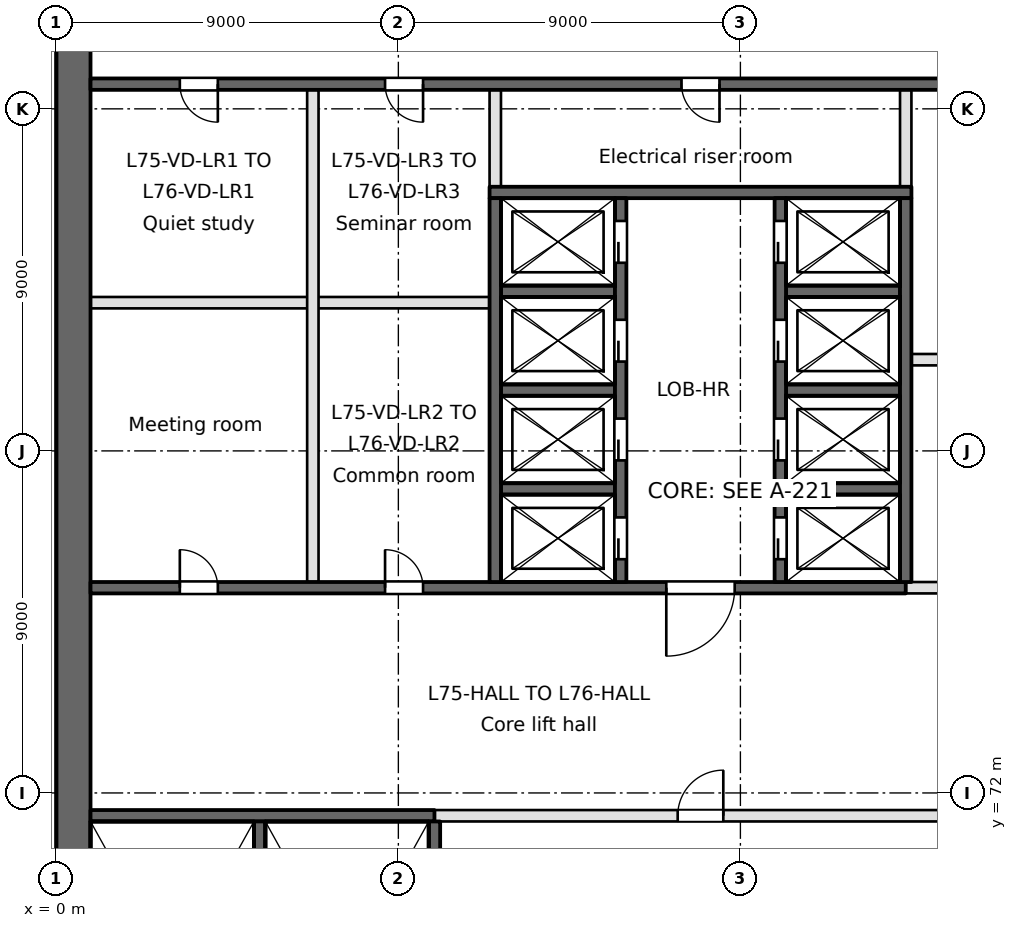
"""IFC4 building model, lengths in metres.
Left out: names, types, materials, properties, quantities, classifications, styles, units other than length and angle.
Written with IfcOpenShell. Run it as: python <this file> out.ifc"""

import sys

from ifc_helpers import new_model, si_unit, direction, frame, frame_2d, origin, place, context, subcontext, project, spatial, rectangle, extrude, element, fill, save


model = new_model("IFC4")
c1 = context("Model", 3, precision=1e-05, world=origin(), true_north=direction((0.0, 1.0)))
c2 = subcontext(c1, "Body", "Model", "MODEL_VIEW")
j1 = project(units=[si_unit("LENGTHUNIT", "METRE"), si_unit("PLANEANGLEUNIT", "RADIAN")], contexts=[c1])
p1 = place(None, origin())
s1 = spatial("IfcSite", under=j1, at=p1, CompositionType="ELEMENT")
p2 = place(p1, origin())
s2 = spatial("IfcBuilding", under=s1, at=p2, CompositionType="ELEMENT")
p3 = place(p2, frame((0.0, 0.0, 291.9)))
s3 = spatial("IfcBuildingStorey", under=s2, at=p3, CompositionType="ELEMENT", Elevation=291.9)
p4 = place(p3, frame((0.45, 94.5, 0.0), z_axis=(0.0, 0.0, 1.0), x_axis=(0.0, -1.0, 0.0)))
e1 = element("IfcWall", 1, at=p4, inside=s3, PredefinedType="SHEAR", context=c2, shape_type="SweptSolid", body=[
    extrude(rectangle(XDim=40.456, YDim=0.9, at=frame_2d((20.228, 0.0))), origin(), (0.0, 0.0, 1.0), 3.7),
])
p5 = place(p3, frame((0.9, 71.4, -0.4), z_axis=(0.0, 0.0, 1.0), x_axis=(1.0, 0.0, 0.0)))
e2 = element("IfcWall", 2, at=p5, inside=s3, PredefinedType="SOLIDWALL", context=c2, shape_type="SweptSolid", body=[
    extrude(rectangle(XDim=9.05, YDim=0.3, at=frame_2d((4.525, 0.0))), origin(), (0.0, 0.0, 1.0), 3.7),
])
p6 = place(p3, frame((9.95, 71.4, 0.0), z_axis=(0.0, 0.0, 1.0), x_axis=(1.0, 0.0, 0.0)))
e3 = element("IfcWall", 3, at=p6, inside=s3, PredefinedType="PARTITIONING", context=c2, shape_type="SweptSolid", body=[
    extrude(rectangle(XDim=17.65, YDim=0.3, at=frame_2d((8.825, 0.0))), origin(), (0.0, 0.0, 1.0), 3.3),
])
p7 = place(p6, frame((14.85, 0.0, 0.0)))
e4 = element("IfcOpeningElement", 4, at=p7, cuts=e3, PredefinedType="OPENING", context=c2, shape_type="SweptSolid", body=[
    extrude(rectangle(XDim=1.8, YDim=2.1, at=frame_2d((0.9, 1.05))), frame((0.0, 0.15, 0.0), z_axis=(0.0, -1.0, 0.0), x_axis=(1.0, 0.0, 0.0)), (0.0, 0.0, 1.0), 0.3),
])
p8 = place(p6, frame((6.4, 0.0, 0.0)))
e5 = element("IfcOpeningElement", 5, at=p8, cuts=e3, PredefinedType="OPENING", context=c2, shape_type="SweptSolid", body=[
    extrude(rectangle(XDim=1.2, YDim=2.1, at=frame_2d((0.6, 1.05))), frame((0.0, 0.15, 0.0), z_axis=(0.0, -1.0, 0.0), x_axis=(1.0, 0.0, 0.0)), (0.0, 0.0, 1.0), 0.3),
])
p9 = place(p3, frame((0.9, 77.4, -0.4), z_axis=(0.0, 0.0, 1.0), x_axis=(1.0, 0.0, 0.0)))
e6 = element("IfcWall", 6, at=p9, inside=s3, PredefinedType="SOLIDWALL", context=c2, shape_type="SweptSolid", body=[
    extrude(rectangle(XDim=21.45, YDim=0.3, at=frame_2d((10.725, 0.0))), origin(), (0.0, 0.0, 1.0), 3.7),
])
p10 = place(p9, frame((15.15, 0.0, 0.4)))
e7 = element("IfcOpeningElement", 7, at=p10, cuts=e6, PredefinedType="OPENING", context=c2, shape_type="SweptSolid", body=[
    extrude(rectangle(XDim=1.8, YDim=2.1, at=frame_2d((0.9, 1.05))), frame((0.0, 0.15, 0.0), z_axis=(0.0, -1.0, 0.0), x_axis=(1.0, 0.0, 0.0)), (0.0, 0.0, 1.0), 0.3),
])
p11 = place(p9, frame((2.35, 0.0, 0.4)))
e8 = element("IfcOpeningElement", 8, at=p11, cuts=e6, PredefinedType="OPENING", context=c2, shape_type="SweptSolid", body=[
    extrude(rectangle(XDim=1.0, YDim=2.1, at=frame_2d((0.5, 1.05))), frame((0.0, 0.15, 0.0), z_axis=(0.0, -1.0, 0.0), x_axis=(1.0, 0.0, 0.0)), (0.0, 0.0, 1.0), 0.3),
])
p12 = place(p9, frame((7.75, 0.0, 0.4)))
e9 = element("IfcOpeningElement", 9, at=p12, cuts=e6, PredefinedType="OPENING", context=c2, shape_type="SweptSolid", body=[
    extrude(rectangle(XDim=1.0, YDim=2.1, at=frame_2d((0.5, 1.05))), frame((0.0, 0.15, 0.0), z_axis=(0.0, -1.0, 0.0), x_axis=(1.0, 0.0, 0.0)), (0.0, 0.0, 1.0), 0.3),
])
p13 = place(p3, frame((22.35, 77.4, 0.0), z_axis=(0.0, 0.0, 1.0), x_axis=(1.0, 0.0, 0.0)))
e10 = element("IfcWall", 10, at=p13, inside=s3, PredefinedType="PARTITIONING", context=c2, shape_type="SweptSolid", body=[
    extrude(rectangle(XDim=13.15, YDim=0.3, at=frame_2d((6.575, 0.0))), origin(), (0.0, 0.0, 1.0), 3.3),
])
p14 = place(p13, frame((3.0, 0.0, 0.0)))
e11 = element("IfcOpeningElement", 11, at=p14, cuts=e10, PredefinedType="OPENING", context=c2, shape_type="SweptSolid", body=[
    extrude(rectangle(XDim=1.0, YDim=2.1, at=frame_2d((0.5, 1.05))), frame((0.0, 0.15, 0.0), z_axis=(0.0, -1.0, 0.0), x_axis=(1.0, 0.0, 0.0)), (0.0, 0.0, 1.0), 0.3),
])
p15 = place(p13, frame((9.7, 0.0, 0.0)))
e12 = element("IfcOpeningElement", 12, at=p15, cuts=e10, PredefinedType="OPENING", context=c2, shape_type="SweptSolid", body=[
    extrude(rectangle(XDim=1.0, YDim=2.1, at=frame_2d((0.5, 1.05))), frame((0.0, 0.15, 0.0), z_axis=(0.0, -1.0, 0.0), x_axis=(1.0, 0.0, 0.0)), (0.0, 0.0, 1.0), 0.3),
])
for number, where, z_axis, x_axis in (
    (13, (11.7, 80.0, -0.4), (0.0, 0.0, 1.0), (1.0, 0.0, 0.0)),
    (14, (19.2, 80.0, -0.4), (0.0, 0.0, 1.0), (1.0, 0.0, 0.0)),
    (15, (11.7, 82.6, -0.4), (0.0, 0.0, 1.0), (1.0, 0.0, 0.0)),
    (16, (19.2, 82.6, -0.4), (0.0, 0.0, 1.0), (1.0, 0.0, 0.0)),
):
    element("IfcWall", number, at=place(p3, frame(where, z_axis=z_axis, x_axis=x_axis)), inside=s3, PredefinedType="SOLIDWALL", context=c2, shape_type="SweptSolid", body=[
        extrude(rectangle(XDim=3.0, YDim=0.3, at=frame_2d((1.5, 0.0))), origin(), (0.0, 0.0, 1.0), 3.7),
    ])
p16 = place(p3, frame((22.5, 83.4, 0.0), z_axis=(0.0, 0.0, 1.0), x_axis=(1.0, 0.0, 0.0)))
e17 = element("IfcWall", 17, at=p16, inside=s3, PredefinedType="PARTITIONING", context=c2, shape_type="SweptSolid", body=[
    extrude(rectangle(XDim=6.7, YDim=0.3, at=frame_2d((3.35, 0.0))), origin(), (0.0, 0.0, 1.0), 3.3),
])
p17 = place(p3, frame((0.9, 84.9, 0.0), z_axis=(0.0, 0.0, 1.0), x_axis=(1.0, 0.0, 0.0)))
e18 = element("IfcWall", 18, at=p17, inside=s3, PredefinedType="PARTITIONING", context=c2, shape_type="SweptSolid", body=[
    extrude(rectangle(XDim=10.5, YDim=0.3, at=frame_2d((5.25, 0.0))), origin(), (0.0, 0.0, 1.0), 3.3),
])
for number, where, z_axis, x_axis in (
    (19, (11.7, 85.2, -0.4), (0.0, 0.0, 1.0), (1.0, 0.0, 0.0)),
    (20, (19.2, 85.2, -0.4), (0.0, 0.0, 1.0), (1.0, 0.0, 0.0)),
):
    element("IfcWall", number, at=place(p3, frame(where, z_axis=z_axis, x_axis=x_axis)), inside=s3, PredefinedType="SOLIDWALL", context=c2, shape_type="SweptSolid", body=[
        extrude(rectangle(XDim=3.0, YDim=0.3, at=frame_2d((1.5, 0.0))), origin(), (0.0, 0.0, 1.0), 3.7),
    ])
p18 = place(p3, frame((11.4, 87.8, -0.4), z_axis=(0.0, 0.0, 1.0), x_axis=(1.0, 0.0, 0.0)))
e21 = element("IfcWall", 21, at=p18, inside=s3, PredefinedType="SOLIDWALL", context=c2, shape_type="SweptSolid", body=[
    extrude(rectangle(XDim=11.1, YDim=0.3, at=frame_2d((5.55, 0.0))), origin(), (0.0, 0.0, 1.0), 3.7),
])
p19 = place(p3, frame((0.9, 90.65, -0.4), z_axis=(0.0, 0.0, 1.0), x_axis=(1.0, 0.0, 0.0)))
e22 = element("IfcWall", 22, at=p19, inside=s3, PredefinedType="SOLIDWALL", context=c2, shape_type="SweptSolid", body=[
    extrude(rectangle(XDim=34.6, YDim=0.3, at=frame_2d((17.3, 0.0))), origin(), (0.0, 0.0, 1.0), 3.7),
])
p20 = place(p19, frame((15.55, 0.0, 0.4)))
e23 = element("IfcOpeningElement", 23, at=p20, cuts=e22, PredefinedType="OPENING", context=c2, shape_type="SweptSolid", body=[
    extrude(rectangle(XDim=1.0, YDim=2.1, at=frame_2d((0.5, 1.05))), frame((0.0, 0.15, 0.0), z_axis=(0.0, -1.0, 0.0), x_axis=(1.0, 0.0, 0.0)), (0.0, 0.0, 1.0), 0.3),
])
p21 = place(p19, frame((2.35, 0.0, 0.4)))
e24 = element("IfcOpeningElement", 24, at=p21, cuts=e22, PredefinedType="OPENING", context=c2, shape_type="SweptSolid", body=[
    extrude(rectangle(XDim=1.0, YDim=2.1, at=frame_2d((0.5, 1.05))), frame((0.0, 0.15, 0.0), z_axis=(0.0, -1.0, 0.0), x_axis=(1.0, 0.0, 0.0)), (0.0, 0.0, 1.0), 0.3),
])
p22 = place(p19, frame((7.75, 0.0, 0.4)))
e25 = element("IfcOpeningElement", 25, at=p22, cuts=e22, PredefinedType="OPENING", context=c2, shape_type="SweptSolid", body=[
    extrude(rectangle(XDim=1.0, YDim=2.1, at=frame_2d((0.5, 1.05))), frame((0.0, 0.15, 0.0), z_axis=(0.0, -1.0, 0.0), x_axis=(1.0, 0.0, 0.0)), (0.0, 0.0, 1.0), 0.3),
])
p23 = place(p19, frame((24.45, 0.0, 0.4)))
e26 = element("IfcOpeningElement", 26, at=p23, cuts=e22, PredefinedType="OPENING", context=c2, shape_type="SweptSolid", body=[
    extrude(rectangle(XDim=1.0, YDim=2.1, at=frame_2d((0.5, 1.05))), frame((0.0, 0.15, 0.0), z_axis=(0.0, -1.0, 0.0), x_axis=(1.0, 0.0, 0.0)), (0.0, 0.0, 1.0), 0.3),
])
p24 = place(p19, frame((31.15, 0.0, 0.4)))
e27 = element("IfcOpeningElement", 27, at=p24, cuts=e22, PredefinedType="OPENING", context=c2, shape_type="SweptSolid", body=[
    extrude(rectangle(XDim=1.0, YDim=2.1, at=frame_2d((0.5, 1.05))), frame((0.0, 0.15, 0.0), z_axis=(0.0, -1.0, 0.0), x_axis=(1.0, 0.0, 0.0)), (0.0, 0.0, 1.0), 0.3),
])
p25 = place(p3, frame((5.35, 63.5, -0.4), z_axis=(0.0, 0.0, 1.0), x_axis=(0.0, 1.0, 0.0)))
e28 = element("IfcWall", 28, at=p25, inside=s3, PredefinedType="SOLIDWALL", context=c2, shape_type="SweptSolid", body=[
    extrude(rectangle(XDim=7.75, YDim=0.3, at=frame_2d((3.875, 0.0))), origin(), (0.0, 0.0, 1.0), 3.7),
])
p26 = place(p3, frame((6.75, 77.55, 0.0), z_axis=(0.0, 0.0, 1.0), x_axis=(0.0, 1.0, 0.0)))
e29 = element("IfcWall", 29, at=p26, inside=s3, PredefinedType="PARTITIONING", context=c2, shape_type="SweptSolid", body=[
    extrude(rectangle(XDim=12.95, YDim=0.3, at=frame_2d((6.475, 0.0))), origin(), (0.0, 0.0, 1.0), 3.3),
])
p27 = place(p3, frame((9.95, 63.5, -0.4), z_axis=(0.0, 0.0, 1.0), x_axis=(0.0, 1.0, 0.0)))
e30 = element("IfcWall", 30, at=p27, inside=s3, PredefinedType="SOLIDWALL", context=c2, shape_type="SweptSolid", body=[
    extrude(rectangle(XDim=7.75, YDim=0.3, at=frame_2d((3.875, 0.0))), origin(), (0.0, 0.0, 1.0), 3.7),
])
p28 = place(p3, frame((11.55, 77.55, -0.4), z_axis=(0.0, 0.0, 1.0), x_axis=(0.0, 1.0, 0.0)))
e31 = element("IfcWall", 31, at=p28, inside=s3, PredefinedType="SOLIDWALL", context=c2, shape_type="SweptSolid", body=[
    extrude(rectangle(XDim=10.1, YDim=0.3, at=frame_2d((5.05, 0.0))), origin(), (0.0, 0.0, 1.0), 3.7),
])
p29 = place(p3, frame((11.55, 87.95, 0.0), z_axis=(0.0, 0.0, 1.0), x_axis=(0.0, 1.0, 0.0)))
e32 = element("IfcWall", 32, at=p29, inside=s3, PredefinedType="PARTITIONING", context=c2, shape_type="SweptSolid", body=[
    extrude(rectangle(XDim=2.55, YDim=0.3, at=frame_2d((1.275, 0.0))), origin(), (0.0, 0.0, 1.0), 3.3),
])
p30 = place(p3, frame((14.85, 77.55, -0.4), z_axis=(0.0, 0.0, 1.0), x_axis=(0.0, 1.0, 0.0)))
e33 = element("IfcWall", 33, at=p30, inside=s3, PredefinedType="SOLIDWALL", context=c2, shape_type="SweptSolid", body=[
    extrude(rectangle(XDim=10.1, YDim=0.3, at=frame_2d((5.05, 0.0))), origin(), (0.0, 0.0, 1.0), 3.7),
])
p31 = place(p30, frame((0.6, 0.0, 0.4)))
e34 = element("IfcOpeningElement", 34, at=p31, cuts=e33, PredefinedType="OPENING", context=c2, shape_type="SweptSolid", body=[
    extrude(rectangle(XDim=1.1, YDim=2.1, at=frame_2d((0.55, 1.05))), frame((0.0, 0.15, 0.0), z_axis=(0.0, -1.0, 0.0), x_axis=(1.0, 0.0, 0.0)), (0.0, 0.0, 1.0), 0.3),
])
p32 = place(p30, frame((3.2, 0.0, 0.4)))
e35 = element("IfcOpeningElement", 35, at=p32, cuts=e33, PredefinedType="OPENING", context=c2, shape_type="SweptSolid", body=[
    extrude(rectangle(XDim=1.1, YDim=2.1, at=frame_2d((0.55, 1.05))), frame((0.0, 0.15, 0.0), z_axis=(0.0, -1.0, 0.0), x_axis=(1.0, 0.0, 0.0)), (0.0, 0.0, 1.0), 0.3),
])
p33 = place(p30, frame((5.8, 0.0, 0.4)))
e36 = element("IfcOpeningElement", 36, at=p33, cuts=e33, PredefinedType="OPENING", context=c2, shape_type="SweptSolid", body=[
    extrude(rectangle(XDim=1.1, YDim=2.1, at=frame_2d((0.55, 1.05))), frame((0.0, 0.15, 0.0), z_axis=(0.0, -1.0, 0.0), x_axis=(1.0, 0.0, 0.0)), (0.0, 0.0, 1.0), 0.3),
])
p34 = place(p30, frame((8.4, 0.0, 0.4)))
e37 = element("IfcOpeningElement", 37, at=p34, cuts=e33, PredefinedType="OPENING", context=c2, shape_type="SweptSolid", body=[
    extrude(rectangle(XDim=1.1, YDim=2.1, at=frame_2d((0.55, 1.05))), frame((0.0, 0.15, 0.0), z_axis=(0.0, -1.0, 0.0), x_axis=(1.0, 0.0, 0.0)), (0.0, 0.0, 1.0), 0.3),
])
p35 = place(p3, frame((19.05, 77.55, -0.4), z_axis=(0.0, 0.0, 1.0), x_axis=(0.0, 1.0, 0.0)))
e38 = element("IfcWall", 38, at=p35, inside=s3, PredefinedType="SOLIDWALL", context=c2, shape_type="SweptSolid", body=[
    extrude(rectangle(XDim=10.1, YDim=0.3, at=frame_2d((5.05, 0.0))), origin(), (0.0, 0.0, 1.0), 3.7),
])
p36 = place(p35, frame((0.6, 0.0, 0.4)))
e39 = element("IfcOpeningElement", 39, at=p36, cuts=e38, PredefinedType="OPENING", context=c2, shape_type="SweptSolid", body=[
    extrude(rectangle(XDim=1.1, YDim=2.1, at=frame_2d((0.55, 1.05))), frame((0.0, 0.15, 0.0), z_axis=(0.0, -1.0, 0.0), x_axis=(1.0, 0.0, 0.0)), (0.0, 0.0, 1.0), 0.3),
])
p37 = place(p35, frame((3.2, 0.0, 0.4)))
e40 = element("IfcOpeningElement", 40, at=p37, cuts=e38, PredefinedType="OPENING", context=c2, shape_type="SweptSolid", body=[
    extrude(rectangle(XDim=1.1, YDim=2.1, at=frame_2d((0.55, 1.05))), frame((0.0, 0.15, 0.0), z_axis=(0.0, -1.0, 0.0), x_axis=(1.0, 0.0, 0.0)), (0.0, 0.0, 1.0), 0.3),
])
p38 = place(p35, frame((5.8, 0.0, 0.4)))
e41 = element("IfcOpeningElement", 41, at=p38, cuts=e38, PredefinedType="OPENING", context=c2, shape_type="SweptSolid", body=[
    extrude(rectangle(XDim=1.1, YDim=2.1, at=frame_2d((0.55, 1.05))), frame((0.0, 0.15, 0.0), z_axis=(0.0, -1.0, 0.0), x_axis=(1.0, 0.0, 0.0)), (0.0, 0.0, 1.0), 0.3),
])
p39 = place(p35, frame((8.4, 0.0, 0.4)))
e42 = element("IfcOpeningElement", 42, at=p39, cuts=e38, PredefinedType="OPENING", context=c2, shape_type="SweptSolid", body=[
    extrude(rectangle(XDim=1.1, YDim=2.1, at=frame_2d((0.55, 1.05))), frame((0.0, 0.15, 0.0), z_axis=(0.0, -1.0, 0.0), x_axis=(1.0, 0.0, 0.0)), (0.0, 0.0, 1.0), 0.3),
])
p40 = place(p3, frame((22.35, 77.55, -0.4), z_axis=(0.0, 0.0, 1.0), x_axis=(0.0, 1.0, 0.0)))
e43 = element("IfcWall", 43, at=p40, inside=s3, PredefinedType="SOLIDWALL", context=c2, shape_type="SweptSolid", body=[
    extrude(rectangle(XDim=10.1, YDim=0.3, at=frame_2d((5.05, 0.0))), origin(), (0.0, 0.0, 1.0), 3.7),
])
p41 = place(p3, frame((22.35, 87.95, 0.0), z_axis=(0.0, 0.0, 1.0), x_axis=(0.0, 1.0, 0.0)))
e44 = element("IfcWall", 44, at=p41, inside=s3, PredefinedType="PARTITIONING", context=c2, shape_type="SweptSolid", body=[
    extrude(rectangle(XDim=2.55, YDim=0.3, at=frame_2d((1.275, 0.0))), origin(), (0.0, 0.0, 1.0), 3.3),
])
p42 = place(p31, origin())
e45 = element("IfcDoor", 45, at=p42, inside=s3, OperationType="SLIDING_TO_RIGHT", PredefinedType="DOOR", context=c2, shape_type="SweptSolid", body=[
    extrude(rectangle(XDim=1.1, YDim=2.1, at=frame_2d((0.55, 1.05))), frame((0.0, 0.025, 0.0), z_axis=(0.0, -1.0, 0.0), x_axis=(1.0, 0.0, 0.0)), (0.0, 0.0, 1.0), 0.05),
])
fill(e34, e45)
p43 = place(p32, origin())
e46 = element("IfcDoor", 46, at=p43, inside=s3, OperationType="SLIDING_TO_LEFT", PredefinedType="DOOR", context=c2, shape_type="SweptSolid", body=[
    extrude(rectangle(XDim=1.1, YDim=2.1, at=frame_2d((0.55, 1.05))), frame((0.0, 0.025, 0.0), z_axis=(0.0, -1.0, 0.0), x_axis=(1.0, 0.0, 0.0)), (0.0, 0.0, 1.0), 0.05),
])
fill(e35, e46)
p44 = place(p33, origin())
e47 = element("IfcDoor", 47, at=p44, inside=s3, OperationType="SLIDING_TO_RIGHT", PredefinedType="DOOR", context=c2, shape_type="SweptSolid", body=[
    extrude(rectangle(XDim=1.1, YDim=2.1, at=frame_2d((0.55, 1.05))), frame((0.0, 0.025, 0.0), z_axis=(0.0, -1.0, 0.0), x_axis=(1.0, 0.0, 0.0)), (0.0, 0.0, 1.0), 0.05),
])
fill(e36, e47)
p45 = place(p34, origin())
e48 = element("IfcDoor", 48, at=p45, inside=s3, OperationType="SLIDING_TO_LEFT", PredefinedType="DOOR", context=c2, shape_type="SweptSolid", body=[
    extrude(rectangle(XDim=1.1, YDim=2.1, at=frame_2d((0.55, 1.05))), frame((0.0, 0.025, 0.0), z_axis=(0.0, -1.0, 0.0), x_axis=(1.0, 0.0, 0.0)), (0.0, 0.0, 1.0), 0.05),
])
fill(e37, e48)
p46 = place(p36, origin())
e49 = element("IfcDoor", 49, at=p46, inside=s3, OperationType="SLIDING_TO_RIGHT", PredefinedType="DOOR", context=c2, shape_type="SweptSolid", body=[
    extrude(rectangle(XDim=1.1, YDim=2.1, at=frame_2d((0.55, 1.05))), frame((0.0, 0.025, 0.0), z_axis=(0.0, -1.0, 0.0), x_axis=(1.0, 0.0, 0.0)), (0.0, 0.0, 1.0), 0.05),
])
fill(e39, e49)
p47 = place(p37, origin())
e50 = element("IfcDoor", 50, at=p47, inside=s3, OperationType="SLIDING_TO_LEFT", PredefinedType="DOOR", context=c2, shape_type="SweptSolid", body=[
    extrude(rectangle(XDim=1.1, YDim=2.1, at=frame_2d((0.55, 1.05))), frame((0.0, 0.025, 0.0), z_axis=(0.0, -1.0, 0.0), x_axis=(1.0, 0.0, 0.0)), (0.0, 0.0, 1.0), 0.05),
])
fill(e40, e50)
p48 = place(p38, origin())
e51 = element("IfcDoor", 51, at=p48, inside=s3, OperationType="SLIDING_TO_RIGHT", PredefinedType="DOOR", context=c2, shape_type="SweptSolid", body=[
    extrude(rectangle(XDim=1.1, YDim=2.1, at=frame_2d((0.55, 1.05))), frame((0.0, 0.025, 0.0), z_axis=(0.0, -1.0, 0.0), x_axis=(1.0, 0.0, 0.0)), (0.0, 0.0, 1.0), 0.05),
])
fill(e41, e51)
p49 = place(p39, origin())
e52 = element("IfcDoor", 52, at=p49, inside=s3, OperationType="SLIDING_TO_LEFT", PredefinedType="DOOR", context=c2, shape_type="SweptSolid", body=[
    extrude(rectangle(XDim=1.1, YDim=2.1, at=frame_2d((0.55, 1.05))), frame((0.0, 0.025, 0.0), z_axis=(0.0, -1.0, 0.0), x_axis=(1.0, 0.0, 0.0)), (0.0, 0.0, 1.0), 0.05),
])
fill(e42, e52)
p50 = place(p10, frame((1.8, 0.0, 0.0), z_axis=(0.0, 0.0, 1.0), x_axis=(-1.0, 0.0, 0.0)))
e53 = element("IfcDoor", 53, at=p50, inside=s3, OperationType="SINGLE_SWING_RIGHT", PredefinedType="DOOR", context=c2, shape_type="SweptSolid", body=[
    extrude(rectangle(XDim=1.8, YDim=2.1, at=frame_2d((0.9, 1.05))), frame((0.0, 0.025, 0.0), z_axis=(0.0, -1.0, 0.0), x_axis=(1.0, 0.0, 0.0)), (0.0, 0.0, 1.0), 0.05),
])
fill(e7, e53)
p51 = place(p8, origin())
e54 = element("IfcDoor", 54, at=p51, inside=s3, OperationType="SINGLE_SWING_RIGHT", PredefinedType="DOOR", context=c2, shape_type="SweptSolid", body=[
    extrude(rectangle(XDim=1.2, YDim=2.1, at=frame_2d((0.6, 1.05))), frame((0.0, 0.025, 0.0), z_axis=(0.0, -1.0, 0.0), x_axis=(1.0, 0.0, 0.0)), (0.0, 0.0, 1.0), 0.05),
])
fill(e5, e54)
p52 = place(p20, frame((1.0, 0.0, 0.0), z_axis=(0.0, 0.0, 1.0), x_axis=(-1.0, 0.0, 0.0)))
e55 = element("IfcDoor", 55, at=p52, inside=s3, OperationType="SINGLE_SWING_LEFT", PredefinedType="DOOR", context=c2, shape_type="SweptSolid", body=[
    extrude(rectangle(XDim=1.0, YDim=2.1, at=frame_2d((0.5, 1.05))), frame((0.0, 0.025, 0.0), z_axis=(0.0, -1.0, 0.0), x_axis=(1.0, 0.0, 0.0)), (0.0, 0.0, 1.0), 0.05),
])
fill(e23, e55)
p53 = place(p11, origin())
e56 = element("IfcDoor", 56, at=p53, inside=s3, OperationType="SINGLE_SWING_LEFT", PredefinedType="DOOR", context=c2, shape_type="SweptSolid", body=[
    extrude(rectangle(XDim=1.0, YDim=2.1, at=frame_2d((0.5, 1.05))), frame((0.0, 0.025, 0.0), z_axis=(0.0, -1.0, 0.0), x_axis=(1.0, 0.0, 0.0)), (0.0, 0.0, 1.0), 0.05),
])
fill(e8, e56)
p54 = place(p21, frame((1.0, 0.0, 0.0), z_axis=(0.0, 0.0, 1.0), x_axis=(-1.0, 0.0, 0.0)))
e57 = element("IfcDoor", 57, at=p54, inside=s3, OperationType="SINGLE_SWING_LEFT", PredefinedType="DOOR", context=c2, shape_type="SweptSolid", body=[
    extrude(rectangle(XDim=1.0, YDim=2.1, at=frame_2d((0.5, 1.05))), frame((0.0, 0.025, 0.0), z_axis=(0.0, -1.0, 0.0), x_axis=(1.0, 0.0, 0.0)), (0.0, 0.0, 1.0), 0.05),
])
fill(e24, e57)
p55 = place(p12, origin())
e58 = element("IfcDoor", 58, at=p55, inside=s3, OperationType="SINGLE_SWING_LEFT", PredefinedType="DOOR", context=c2, shape_type="SweptSolid", body=[
    extrude(rectangle(XDim=1.0, YDim=2.1, at=frame_2d((0.5, 1.05))), frame((0.0, 0.025, 0.0), z_axis=(0.0, -1.0, 0.0), x_axis=(1.0, 0.0, 0.0)), (0.0, 0.0, 1.0), 0.05),
])
fill(e9, e58)
p56 = place(p22, frame((1.0, 0.0, 0.0), z_axis=(0.0, 0.0, 1.0), x_axis=(-1.0, 0.0, 0.0)))
e59 = element("IfcDoor", 59, at=p56, inside=s3, OperationType="SINGLE_SWING_LEFT", PredefinedType="DOOR", context=c2, shape_type="SweptSolid", body=[
    extrude(rectangle(XDim=1.0, YDim=2.1, at=frame_2d((0.5, 1.05))), frame((0.0, 0.025, 0.0), z_axis=(0.0, -1.0, 0.0), x_axis=(1.0, 0.0, 0.0)), (0.0, 0.0, 1.0), 0.05),
])
fill(e25, e59)
save(model, sys.argv[1])
